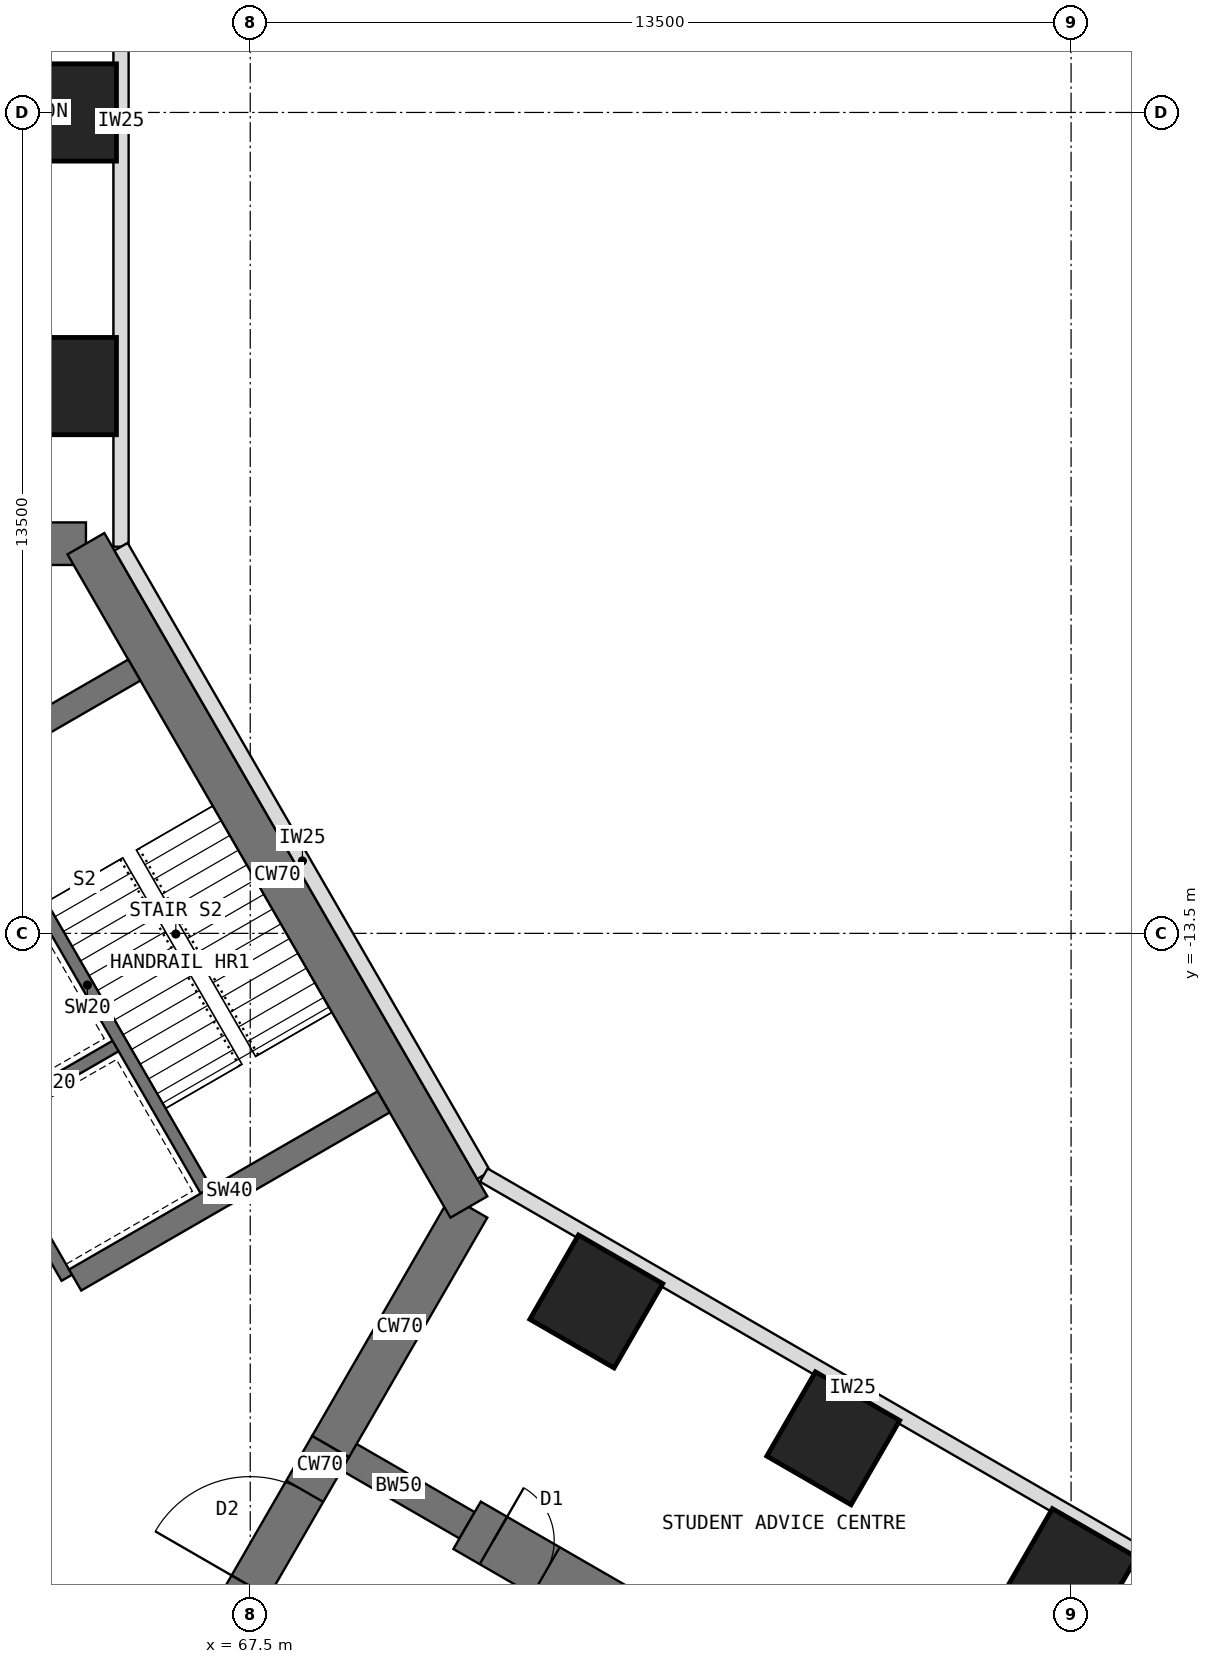
"""IFC4 building model, lengths in metres.
Left out: names, types, materials, properties, quantities, classifications, styles, units other than length and angle.
Written with IfcOpenShell. Run it as: python <this file> out.ifc"""

import sys

from ifc_helpers import new_model, si_unit, direction, frame, frame_2d, origin, origin_2d, place, context, subcontext, project, spatial, rectangle, extrude, element, fill, save


model = new_model("IFC4")
c1 = context("Model", 3, precision=1e-05, world=origin(), true_north=direction((0.0, 1.0)))
c2 = subcontext(c1, "Body", "Model", "MODEL_VIEW")
j1 = project(units=[si_unit("LENGTHUNIT", "METRE"), si_unit("PLANEANGLEUNIT", "RADIAN")], contexts=[c1])
p1 = place(None, origin())
s1 = spatial("IfcSite", under=j1, at=p1, CompositionType="ELEMENT")
p2 = place(p1, origin())
s2 = spatial("IfcBuilding", under=s1, at=p2, CompositionType="ELEMENT")
p3 = place(p2, origin())
s3 = spatial("IfcBuildingStorey", under=s2, at=p3, CompositionType="ELEMENT", Elevation=0.0)
for number, where, z_axis, x_axis in (
    (1, (81.0, -13.5, 0.0), (0.0, 0.0, 1.0), (1.0, 0.0, 0.0)),
    (2, (67.5, 0.0, 0.0), (0.0, 0.0, 1.0), (1.0, 0.0, 0.0)),
    (3, (81.0, 0.0, 0.0), (0.0, 0.0, 1.0), (1.0, 0.0, 0.0)),
):
    element("IfcColumn", number, at=place(p3, frame(where, z_axis=z_axis, x_axis=x_axis)), inside=s3, PredefinedType="COLUMN", context=c2, shape_type="SweptSolid", body=[
        extrude(rectangle(XDim=1.5, YDim=1.5, at=origin_2d()), origin(), (0.0, 0.0, 1.0), 5.5),
    ])
p4 = place(p3, frame((64.798, -7.092, 0.0), z_axis=(0.0, 0.0, 1.0), x_axis=(-1.0, 0.0, 0.0)))
e4 = element("IfcWall", 4, at=p4, inside=s3, PredefinedType="SHEAR", context=c2, shape_type="SweptSolid", body=[
    extrude(rectangle(XDim=4.548, YDim=0.7, at=frame_2d((2.274, 0.0))), origin(), (0.0, 0.0, 1.0), 5.5),
])
p5 = place(p3, frame((67.072, -24.97, 0.0), z_axis=(0.0, 0.0, 1.0), x_axis=(0.500010275428, 0.866019471182, 0.0)))
e5 = element("IfcWall", 5, at=p5, inside=s3, PredefinedType="SHEAR", context=c2, shape_type="SweptSolid", body=[
    extrude(rectangle(XDim=3.5, YDim=0.7, at=frame_2d((1.75, 0.0))), origin(), (0.0, 0.0, 1.0), 5.5),
])
p6 = place(p5, frame((0.85, 0.0, 0.0)))
e6 = element("IfcOpeningElement", 6, at=p6, cuts=e5, PredefinedType="OPENING", context=c2, shape_type="SweptSolid", body=[
    extrude(rectangle(XDim=1.8, YDim=2.1, at=frame_2d((0.9, 1.05))), frame((0.0, 0.36, 0.0), z_axis=(0.0, -1.0, 0.0), x_axis=(1.0, 0.0, 0.0)), (0.0, 0.0, 1.0), 0.72),
])
p7 = place(p3, frame((68.822, -21.939, 0.0), z_axis=(0.0, 0.0, 1.0), x_axis=(0.500024481964, 0.866011268655, 0.0)))
e7 = element("IfcWall", 7, at=p7, inside=s3, PredefinedType="SHEAR", context=c2, shape_type="SweptSolid", body=[
    extrude(rectangle(XDim=4.548, YDim=0.7, at=frame_2d((2.274, 0.0))), origin(), (0.0, 0.0, 1.0), 5.5),
])
p8 = place(p3, frame((71.096, -18.0, 0.0), z_axis=(0.0, 0.0, 1.0), x_axis=(-0.500005998175, 0.866021940709, 0.0)))
e8 = element("IfcWall", 8, at=p8, inside=s3, PredefinedType="SHEAR", context=c2, shape_type="SweptSolid", body=[
    extrude(rectangle(XDim=12.596, YDim=0.7, at=frame_2d((6.298, 0.0))), origin(), (0.0, 0.0, 1.0), 5.5),
])
p9 = place(p3, frame((68.822, -21.939, 0.0), z_axis=(0.0, 0.0, 1.0), x_axis=(0.866072649678, -0.499918158782, 0.0)))
e9 = element("IfcWall", 9, at=p9, inside=s3, PredefinedType="SHEAR", context=c2, shape_type="SweptSolid", body=[
    extrude(rectangle(XDim=2.592, YDim=0.5, at=frame_2d((1.296, 0.0))), origin(), (0.0, 0.0, 1.0), 5.5),
])
p10 = place(p3, frame((71.066, -23.234, 0.0), z_axis=(0.0, 0.0, 1.0), x_axis=(0.86602681393, -0.499997557548, 0.0)))
e10 = element("IfcWall", 10, at=p10, inside=s3, PredefinedType="SHEAR", context=c2, shape_type="SweptSolid", body=[
    extrude(rectangle(XDim=9.5, YDim=0.9, at=frame_2d((4.75, 0.0))), origin(), (0.0, 0.0, 1.0), 5.5),
])
p11 = place(p10, frame((0.5, 0.0, 0.0)))
e11 = element("IfcOpeningElement", 11, at=p11, cuts=e10, PredefinedType="OPENING", context=c2, shape_type="SweptSolid", body=[
    extrude(rectangle(XDim=1.0, YDim=2.1, at=frame_2d((0.5, 1.05))), frame((0.0, 0.46, 0.0), z_axis=(0.0, -1.0, 0.0), x_axis=(1.0, 0.0, 0.0)), (0.0, 0.0, 1.0), 0.92),
])
for number, where, z_axis, x_axis in (
    (12, (64.5, -4.5, 0.0), (0.0, 0.0, 1.0), (1.0, 0.0, 0.0)),
    (13, (64.5, 0.0, 0.0), (0.0, 0.0, 1.0), (1.0, 0.0, 0.0)),
    (14, (73.191, -19.554, 0.0), (0.0, 0.0, 1.0), (0.5, 0.866, 0.0)),
    (15, (77.088, -21.804, 0.0), (0.0, 0.0, 1.0), (0.5, 0.866, 0.0)),
    (16, (80.986, -24.054, 0.0), (0.0, 0.0, 1.0), (0.5, 0.866, 0.0)),
):
    element("IfcColumn", number, at=place(p3, frame(where, z_axis=z_axis, x_axis=x_axis)), inside=s3, PredefinedType="COLUMN", context=c2, shape_type="SweptSolid", body=[
        extrude(rectangle(XDim=1.6, YDim=1.6, at=origin_2d()), origin(), (0.0, 0.0, 1.0), 5.5),
    ])
p12 = place(p3, frame((64.484, -19.164, 0.0), z_axis=(0.0, 0.0, 1.0), x_axis=(-0.49999894854, 0.866026010844, 0.0)))
e17 = element("IfcWall", 17, at=p12, inside=s3, PredefinedType="SHEAR", context=c2, shape_type="SweptSolid", body=[
    extrude(rectangle(XDim=8.0, YDim=0.2, at=frame_2d((4.0, 0.0))), origin(), (0.0, 0.0, 1.0), 5.5),
])
p13 = place(p12, frame((6.3, 0.0, 0.0)))
e18 = element("IfcOpeningElement", 18, at=p13, cuts=e17, PredefinedType="OPENING", context=c2, shape_type="SweptSolid", body=[
    extrude(rectangle(XDim=1.2, YDim=2.1, at=frame_2d((0.6, 1.05))), frame((0.0, 0.11, 0.0), z_axis=(0.0, -1.0, 0.0), x_axis=(1.0, 0.0, 0.0)), (0.0, 0.0, 1.0), 0.22),
])
p14 = place(p3, frame((63.12, -16.603, 0.0), z_axis=(0.0, 0.0, 1.0), x_axis=(0.866062058628, 0.499936506574, 0.0)))
e19 = element("IfcWall", 19, at=p14, inside=s3, PredefinedType="SHEAR", context=c2, shape_type="SweptSolid", body=[
    extrude(rectangle(XDim=2.6, YDim=0.2, at=frame_2d((1.3, 0.0))), origin(), (0.0, 0.0, 1.0), 5.5),
])
p15 = place(p3, frame((66.822, -17.814, 0.0), z_axis=(0.0, 0.0, 1.0), x_axis=(-0.49999894854, 0.866026010844, 0.0)))
e20 = element("IfcWall", 20, at=p15, inside=s3, PredefinedType="SHEAR", context=c2, shape_type="SweptSolid", body=[
    extrude(rectangle(XDim=8.0, YDim=0.2, at=frame_2d((4.0, 0.0))), origin(), (0.0, 0.0, 1.0), 5.5),
])
p16 = place(p15, frame((6.7, 0.0, 0.0)))
e21 = element("IfcOpeningElement", 21, at=p16, cuts=e20, PredefinedType="OPENING", context=c2, shape_type="SweptSolid", body=[
    extrude(rectangle(XDim=1.1, YDim=2.1, at=frame_2d((0.55, 1.05))), frame((0.0, 0.11, 0.0), z_axis=(0.0, -1.0, 0.0), x_axis=(1.0, 0.0, 0.0)), (0.0, 0.0, 1.0), 0.22),
])
for number, where, z_axis, x_axis in (
    (22, (60.52, -12.099, 0.0), (0.0, 0.0, 1.0), (0.866, 0.5, 0.0)),
    (23, (64.62, -19.201, 0.0), (0.0, 0.0, 1.0), (0.866, 0.5, 0.0)),
):
    element("IfcWall", number, at=place(p3, frame(where, z_axis=z_axis, x_axis=x_axis)), inside=s3, PredefinedType="SHEAR", context=c2, shape_type="SweptSolid", body=[
        extrude(rectangle(XDim=5.858, YDim=0.4, at=frame_2d((2.929, 0.0))), origin(), (0.0, 0.0, 1.0), 5.5),
    ])
p17 = place(p3, frame((65.55, 0.0, 0.0), z_axis=(0.0, 0.0, 1.0), x_axis=(1.0, 0.0, 0.0)))
e24 = element("IfcWall", 24, at=p17, inside=s3, PredefinedType="PARTITIONING", context=c2, shape_type="SweptSolid", body=[
    extrude(rectangle(XDim=1.95, YDim=0.2, at=frame_2d((0.975, 0.0))), origin(), (0.0, 0.0, 1.0), 5.15),
])
p18 = place(p3, frame((67.5, 0.0, 0.0), z_axis=(0.0, 0.0, 1.0), x_axis=(0.0, 1.0, 0.0)))
e25 = element("IfcWall", 25, at=p18, inside=s3, PredefinedType="PARTITIONING", context=c2, shape_type="SweptSolid", body=[
    extrude(rectangle(XDim=13.5, YDim=0.2, at=frame_2d((6.75, 0.0))), origin(), (0.0, 0.0, 1.0), 3.75),
])
p19 = place(p18, frame((5.85, 0.0, 0.0)))
e26 = element("IfcOpeningElement", 26, at=p19, cuts=e25, PredefinedType="OPENING", context=c2, shape_type="SweptSolid", body=[
    extrude(rectangle(XDim=1.8, YDim=2.4, at=frame_2d((0.9, 1.2))), frame((0.0, 0.11, 0.0), z_axis=(0.0, -1.0, 0.0), x_axis=(1.0, 0.0, 0.0)), (0.0, 0.0, 1.0), 0.22),
])
p20 = place(p3, frame((81.0, -22.85, 0.0), z_axis=(0.0, 0.0, 1.0), x_axis=(0.0, 1.0, 0.0)))
e27 = element("IfcWall", 27, at=p20, inside=s3, PredefinedType="PARTITIONING", context=c2, shape_type="SweptSolid", body=[
    extrude(rectangle(XDim=9.35, YDim=0.2, at=frame_2d((4.675, 0.0))), origin(), (0.0, 0.0, 1.0), 5.15),
])
p21 = place(p20, frame((3.775, 0.0, 0.0)))
e28 = element("IfcOpeningElement", 28, at=p21, cuts=e27, PredefinedType="OPENING", context=c2, shape_type="SweptSolid", body=[
    extrude(rectangle(XDim=1.8, YDim=2.4, at=frame_2d((0.9, 1.2))), frame((0.0, 0.11, 0.0), z_axis=(0.0, -1.0, 0.0), x_axis=(1.0, 0.0, 0.0)), (0.0, 0.0, 1.0), 0.22),
])
p22 = place(p3, frame((81.0, -13.5, 0.0), z_axis=(0.0, 0.0, 1.0), x_axis=(0.0, 1.0, 0.0)))
e29 = element("IfcWall", 29, at=p22, inside=s3, PredefinedType="PARTITIONING", context=c2, shape_type="SweptSolid", body=[
    extrude(rectangle(XDim=13.5, YDim=0.2, at=frame_2d((6.75, 0.0))), origin(), (0.0, 0.0, 1.0), 3.75),
])
p23 = place(p22, frame((3.6, 0.0, 0.0)))
e30 = element("IfcOpeningElement", 30, at=p23, cuts=e29, PredefinedType="OPENING", context=c2, shape_type="SweptSolid", body=[
    extrude(rectangle(XDim=1.8, YDim=2.4, at=frame_2d((0.9, 1.2))), frame((0.0, 0.11, 0.0), z_axis=(0.0, -1.0, 0.0), x_axis=(1.0, 0.0, 0.0)), (0.0, 0.0, 1.0), 0.22),
])
p24 = place(p22, frame((8.1, 0.0, 0.0)))
e31 = element("IfcOpeningElement", 31, at=p24, cuts=e29, PredefinedType="OPENING", context=c2, shape_type="SweptSolid", body=[
    extrude(rectangle(XDim=1.8, YDim=2.4, at=frame_2d((0.9, 1.2))), frame((0.0, 0.11, 0.0), z_axis=(0.0, -1.0, 0.0), x_axis=(1.0, 0.0, 0.0)), (0.0, 0.0, 1.0), 0.22),
])
p25 = place(p3, frame((67.5, 0.0, 0.0), z_axis=(0.0, 0.0, 1.0), x_axis=(1.0, 0.0, 0.0)))
e32 = element("IfcWall", 32, at=p25, inside=s3, PredefinedType="PARTITIONING", context=c2, shape_type="SweptSolid", body=[
    extrude(rectangle(XDim=13.5, YDim=0.2, at=frame_2d((6.75, 0.0))), origin(), (0.0, 0.0, 1.0), 3.75),
])
p26 = place(p25, frame((5.85, 0.0, 0.0)))
e33 = element("IfcOpeningElement", 33, at=p26, cuts=e32, PredefinedType="OPENING", context=c2, shape_type="SweptSolid", body=[
    extrude(rectangle(XDim=1.8, YDim=2.4, at=frame_2d((0.9, 1.2))), frame((0.0, 0.11, 0.0), z_axis=(0.0, -1.0, 0.0), x_axis=(1.0, 0.0, 0.0)), (0.0, 0.0, 1.0), 0.22),
])
p27 = place(p3, frame((81.0, -13.5, 0.0), z_axis=(0.0, 0.0, 1.0), x_axis=(1.0, 0.0, 0.0)))
e34 = element("IfcWall", 34, at=p27, inside=s3, PredefinedType="PARTITIONING", context=c2, shape_type="SweptSolid", body=[
    extrude(rectangle(XDim=13.5, YDim=0.2, at=frame_2d((6.75, 0.0))), origin(), (0.0, 0.0, 1.0), 3.75),
])
p28 = place(p27, frame((5.85, 0.0, 0.0)))
e35 = element("IfcOpeningElement", 35, at=p28, cuts=e34, PredefinedType="OPENING", context=c2, shape_type="SweptSolid", body=[
    extrude(rectangle(XDim=1.8, YDim=2.4, at=frame_2d((0.9, 1.2))), frame((0.0, 0.11, 0.0), z_axis=(0.0, -1.0, 0.0), x_axis=(1.0, 0.0, 0.0)), (0.0, 0.0, 1.0), 0.22),
])
p29 = place(p3, frame((81.0, 0.0, 0.0), z_axis=(0.0, 0.0, 1.0), x_axis=(1.0, 0.0, 0.0)))
e36 = element("IfcWall", 36, at=p29, inside=s3, PredefinedType="PARTITIONING", context=c2, shape_type="SweptSolid", body=[
    extrude(rectangle(XDim=13.5, YDim=0.2, at=frame_2d((6.75, 0.0))), origin(), (0.0, 0.0, 1.0), 3.75),
])
p30 = place(p29, frame((5.85, 0.0, 0.0)))
e37 = element("IfcOpeningElement", 37, at=p30, cuts=e36, PredefinedType="OPENING", context=c2, shape_type="SweptSolid", body=[
    extrude(rectangle(XDim=1.8, YDim=2.4, at=frame_2d((0.9, 1.2))), frame((0.0, 0.11, 0.0), z_axis=(0.0, -1.0, 0.0), x_axis=(1.0, 0.0, 0.0)), (0.0, 0.0, 1.0), 0.22),
])
p31 = place(p3, frame((65.375, 6.875, 0.0), z_axis=(0.0, 0.0, 1.0), x_axis=(0.0, -1.0, 0.0)))
e38 = element("IfcWall", 38, at=p31, inside=s3, PredefinedType="STANDARD", context=c2, shape_type="SweptSolid", body=[
    extrude(rectangle(XDim=14.016, YDim=0.25, at=frame_2d((7.008, 0.0))), origin(), (0.0, 0.0, 1.0), 5.15),
])
p32 = place(p3, frame((65.375, -7.141, 0.0), z_axis=(0.0, 0.0, 1.0), x_axis=(0.499996365031, -0.866027502425, 0.0)))
e39 = element("IfcWall", 39, at=p32, inside=s3, PredefinedType="STANDARD", context=c2, shape_type="SweptSolid", body=[
    extrude(rectangle(XDim=11.933, YDim=0.25, at=frame_2d((5.967, 0.0))), origin(), (0.0, 0.0, 1.0), 5.15),
])
p33 = place(p3, frame((71.342, -17.476, 0.0), z_axis=(0.0, 0.0, 1.0), x_axis=(0.866027500821, -0.499996367808, 0.0)))
e40 = element("IfcWall", 40, at=p33, inside=s3, PredefinedType="STANDARD", context=c2, shape_type="SweptSolid", body=[
    extrude(rectangle(XDim=14.016, YDim=0.25, at=frame_2d((7.008, 0.0))), origin(), (0.0, 0.0, 1.0), 5.15),
])
p34 = place(p6, origin())
e41 = element("IfcDoor", 41, at=p34, inside=s3, OperationType="DOUBLE_DOOR_DOUBLE_SWING", PredefinedType="DOOR", context=c2, shape_type="SweptSolid", body=[
    extrude(rectangle(XDim=1.72, YDim=2.06, at=frame_2d((0.9, 1.03))), frame((0.0, 0.025, 0.0), z_axis=(0.0, -1.0, 0.0), x_axis=(1.0, 0.0, 0.0)), (0.0, 0.0, 1.0), 0.05),
    extrude(rectangle(XDim=0.04, YDim=2.1, at=frame_2d((0.02, 1.05))), frame((0.0, 0.35, 0.0), z_axis=(0.0, -1.0, 0.0), x_axis=(1.0, 0.0, 0.0)), (0.0, 0.0, 1.0), 0.699),
    extrude(rectangle(XDim=0.04, YDim=2.1, at=frame_2d((1.78, 1.05))), frame((0.0, 0.35, 0.0), z_axis=(0.0, -1.0, 0.0), x_axis=(1.0, 0.0, 0.0)), (0.0, 0.0, 1.0), 0.699),
    extrude(rectangle(XDim=1.72, YDim=0.04, at=frame_2d((0.9, 2.08))), frame((0.0, 0.35, 0.0), z_axis=(0.0, -1.0, 0.0), x_axis=(1.0, 0.0, 0.0)), (0.0, 0.0, 1.0), 0.699),
])
fill(e6, e41)
p35 = place(p11, origin())
e42 = element("IfcDoor", 42, at=p35, inside=s3, OperationType="SINGLE_SWING_LEFT", PredefinedType="DOOR", context=c2, shape_type="SweptSolid", body=[
    extrude(rectangle(XDim=0.92, YDim=2.06, at=frame_2d((0.5, 1.03))), frame((0.0, 0.025, 0.0), z_axis=(0.0, -1.0, 0.0), x_axis=(1.0, 0.0, 0.0)), (0.0, 0.0, 1.0), 0.05),
    extrude(rectangle(XDim=0.04, YDim=2.1, at=frame_2d((0.02, 1.05))), frame((0.0, 0.45, 0.0), z_axis=(0.0, -1.0, 0.0), x_axis=(1.0, 0.0, 0.0)), (0.0, 0.0, 1.0), 0.899),
    extrude(rectangle(XDim=0.04, YDim=2.1, at=frame_2d((0.98, 1.05))), frame((0.0, 0.45, 0.0), z_axis=(0.0, -1.0, 0.0), x_axis=(1.0, 0.0, 0.0)), (0.0, 0.0, 1.0), 0.899),
    extrude(rectangle(XDim=0.92, YDim=0.04, at=frame_2d((0.5, 2.08))), frame((0.0, 0.45, 0.0), z_axis=(0.0, -1.0, 0.0), x_axis=(1.0, 0.0, 0.0)), (0.0, 0.0, 1.0), 0.899),
])
fill(e11, e42)
p36 = place(p23, origin())
e43 = element("IfcDoor", 43, at=p36, inside=s3, OperationType="DOUBLE_DOOR_DOUBLE_SWING", PredefinedType="DOOR", context=c2, shape_type="SweptSolid", body=[
    extrude(rectangle(XDim=1.8, YDim=2.4, at=frame_2d((0.9, 1.2))), frame((0.0, 0.025, 0.0), z_axis=(0.0, -1.0, 0.0), x_axis=(1.0, 0.0, 0.0)), (0.0, 0.0, 1.0), 0.05),
])
fill(e30, e43)
p37 = place(p24, origin())
e44 = element("IfcDoor", 44, at=p37, inside=s3, OperationType="DOUBLE_DOOR_DOUBLE_SWING", PredefinedType="DOOR", context=c2, shape_type="SweptSolid", body=[
    extrude(rectangle(XDim=1.8, YDim=2.4, at=frame_2d((0.9, 1.2))), frame((0.0, 0.025, 0.0), z_axis=(0.0, -1.0, 0.0), x_axis=(1.0, 0.0, 0.0)), (0.0, 0.0, 1.0), 0.05),
])
fill(e31, e44)
p38 = place(p26, origin())
e45 = element("IfcDoor", 45, at=p38, inside=s3, OperationType="DOUBLE_DOOR_DOUBLE_SWING", PredefinedType="DOOR", context=c2, shape_type="SweptSolid", body=[
    extrude(rectangle(XDim=1.8, YDim=2.4, at=frame_2d((0.9, 1.2))), frame((0.0, 0.025, 0.0), z_axis=(0.0, -1.0, 0.0), x_axis=(1.0, 0.0, 0.0)), (0.0, 0.0, 1.0), 0.05),
])
fill(e33, e45)
p39 = place(p21, origin())
e46 = element("IfcDoor", 46, at=p39, inside=s3, OperationType="DOUBLE_DOOR_DOUBLE_SWING", PredefinedType="DOOR", context=c2, shape_type="SweptSolid", body=[
    extrude(rectangle(XDim=1.8, YDim=2.4, at=frame_2d((0.9, 1.2))), frame((0.0, 0.025, 0.0), z_axis=(0.0, -1.0, 0.0), x_axis=(1.0, 0.0, 0.0)), (0.0, 0.0, 1.0), 0.05),
])
fill(e28, e46)
save(model, sys.argv[1])
